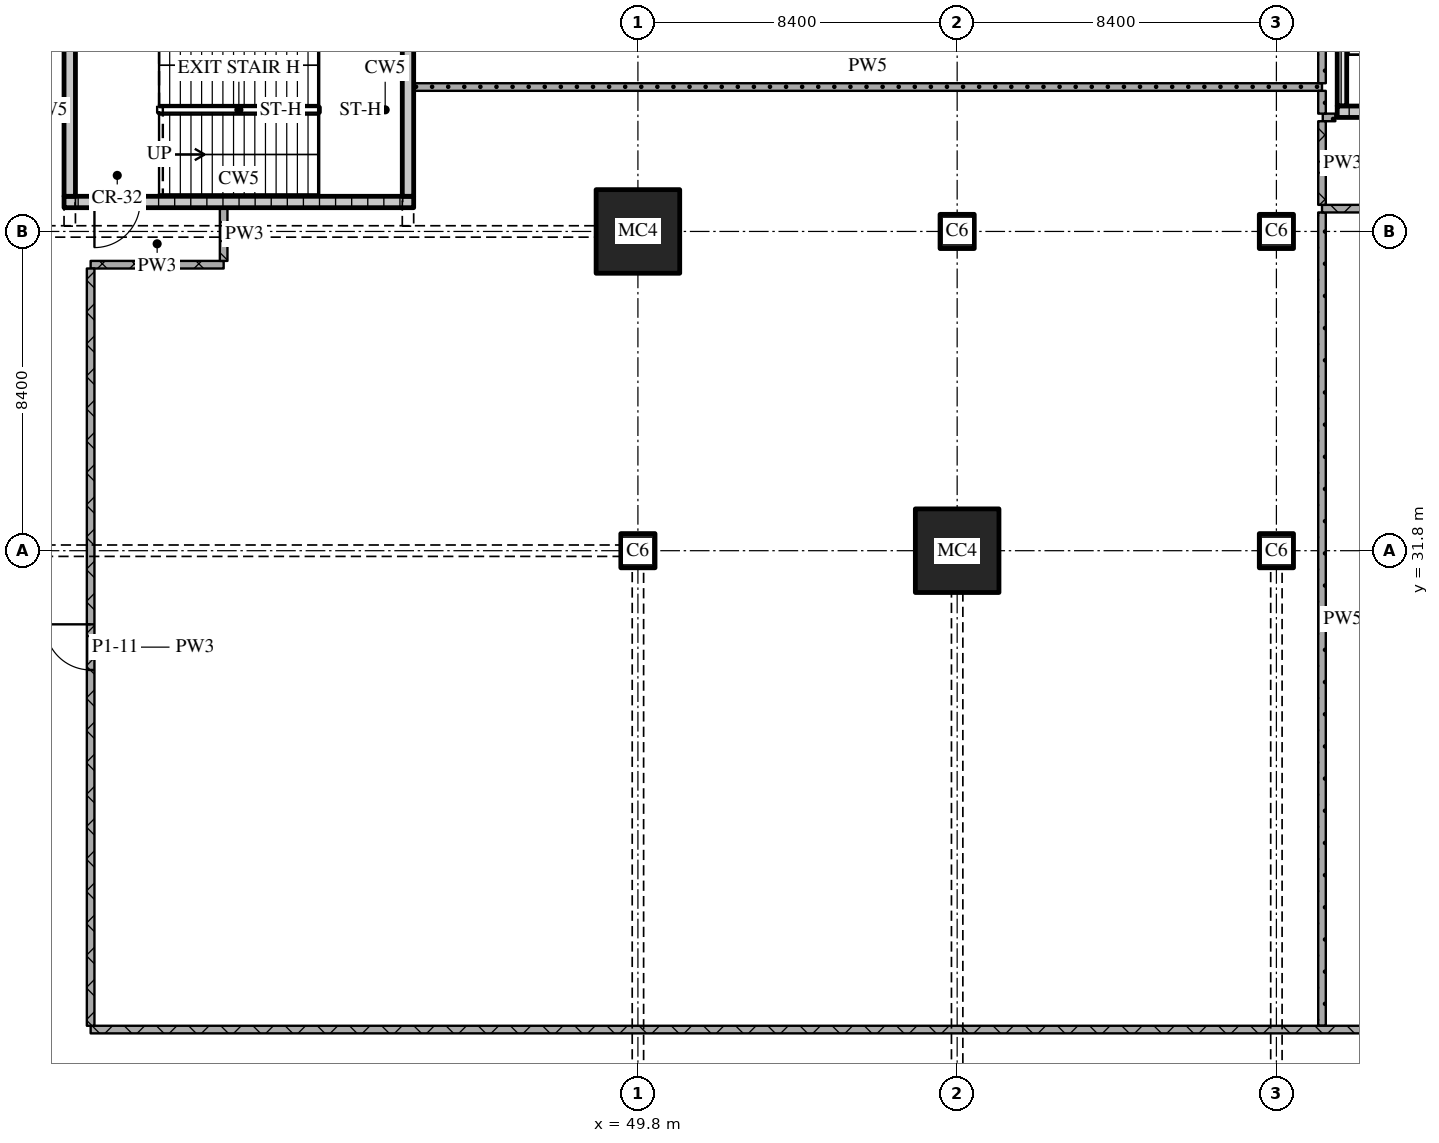
"""IFC4 building model, lengths in metres.
Left out: names, types, materials, properties, quantities, classifications, styles, units other than length and angle.
Written with IfcOpenShell. Run it as: python <this file> out.ifc"""

import sys

from ifc_helpers import new_model, si_unit, direction, frame, frame_2d, origin, origin_2d, place, context, subcontext, project, spatial, rectangle, extrude, element, fill, save


model = new_model("IFC4")
c1 = context("Model", 3, precision=1e-05, world=origin(), true_north=direction((0.0, 1.0)))
c2 = subcontext(c1, "Body", "Model", "MODEL_VIEW")
j1 = project(units=[si_unit("LENGTHUNIT", "METRE"), si_unit("PLANEANGLEUNIT", "RADIAN")], contexts=[c1])
p1 = place(None, origin())
s1 = spatial("IfcSite", under=j1, at=p1, CompositionType="ELEMENT")
p2 = place(p1, origin())
s2 = spatial("IfcBuilding", under=s1, at=p2, CompositionType="ELEMENT")
p3 = place(p2, frame((0.0, 0.0, 9.0)))
s3 = spatial("IfcBuildingStorey", under=s2, at=p3, CompositionType="ELEMENT", Elevation=9.0)
p4 = place(p3, frame((49.8, 31.8, 0.0), z_axis=(0.0, 0.0, 1.0), x_axis=(1.0, 0.0, 0.0)))
e1 = element("IfcColumn", 1, at=p4, inside=s3, PredefinedType="COLUMN", context=c2, shape_type="SweptSolid", body=[
    extrude(rectangle(XDim=0.9, YDim=0.9, at=origin_2d()), origin(), (0.0, 0.0, 1.0), 5.4),
])
for number, where, z_axis, x_axis in (
    (2, (49.8, 40.2, 0.0), (0.0, 0.0, 1.0), (1.0, 0.0, 0.0)),
    (3, (58.2, 31.8, 0.0), (0.0, 0.0, 1.0), (1.0, 0.0, 0.0)),
):
    element("IfcColumn", number, at=place(p3, frame(where, z_axis=z_axis, x_axis=x_axis)), inside=s3, PredefinedType="COLUMN", context=c2, shape_type="SweptSolid", body=[
        extrude(rectangle(XDim=2.2, YDim=2.2, at=origin_2d()), origin(), (0.0, 0.0, 1.0), 5.4),
    ])
for number, where, z_axis, x_axis in (
    (4, (58.2, 40.2, 0.0), (0.0, 0.0, 1.0), (1.0, 0.0, 0.0)),
    (5, (66.6, 31.8, 0.0), (0.0, 0.0, 1.0), (1.0, 0.0, 0.0)),
    (6, (66.6, 40.2, 0.0), (0.0, 0.0, 1.0), (1.0, 0.0, 0.0)),
):
    element("IfcColumn", number, at=place(p3, frame(where, z_axis=z_axis, x_axis=x_axis)), inside=s3, PredefinedType="COLUMN", context=c2, shape_type="SweptSolid", body=[
        extrude(rectangle(XDim=0.9, YDim=0.9, at=origin_2d()), origin(), (0.0, 0.0, 1.0), 5.4),
    ])
p5 = place(p3, frame((68.2, 43.35, 0.0), z_axis=(0.0, 0.0, 1.0), x_axis=(1.0, 0.0, 0.0)))
e7 = element("IfcWall", 7, at=p5, inside=s3, PredefinedType="SOLIDWALL", context=c2, shape_type="SweptSolid", body=[
    extrude(rectangle(XDim=5.6, YDim=0.3, at=frame_2d((2.8, 0.0))), origin(), (0.0, 0.0, 1.0), 5.1),
])
p6 = place(p5, frame((3.875, 0.0, 0.0)))
e8 = element("IfcOpeningElement", 8, at=p6, cuts=e7, PredefinedType="OPENING", context=c2, shape_type="SweptSolid", body=[
    extrude(rectangle(XDim=1.0, YDim=2.1, at=frame_2d((0.5, 1.05))), frame((0.0, 0.16, 0.0), z_axis=(0.0, -1.0, 0.0), x_axis=(1.0, 0.0, 0.0)), (0.0, 0.0, 1.0), 0.32),
])
p7 = place(p3, frame((68.325, 43.5, 0.0), z_axis=(0.0, 0.0, 1.0), x_axis=(0.0, 1.0, 0.0)))
e9 = element("IfcWall", 9, at=p7, inside=s3, PredefinedType="SOLIDWALL", context=c2, shape_type="SweptSolid", body=[
    extrude(rectangle(XDim=6.9, YDim=0.25, at=frame_2d((3.45, 0.0))), origin(), (0.0, 0.0, 1.0), 5.1),
])
p8 = place(p3, frame((34.7, 40.975, 0.0), z_axis=(0.0, 0.0, 1.0), x_axis=(1.0, 0.0, 0.0)))
e10 = element("IfcWall", 10, at=p8, inside=s3, PredefinedType="SOLIDWALL", context=c2, shape_type="SweptSolid", body=[
    extrude(rectangle(XDim=9.2, YDim=0.3, at=frame_2d((4.6, 0.0))), origin(), (0.0, 0.0, 1.0), 5.1),
])
p9 = place(p8, frame((0.8, 0.0, 0.0)))
e11 = element("IfcOpeningElement", 11, at=p9, cuts=e10, PredefinedType="OPENING", context=c2, shape_type="SweptSolid", body=[
    extrude(rectangle(XDim=1.2, YDim=2.1, at=frame_2d((0.6, 1.05))), frame((0.0, 0.16, 0.0), z_axis=(0.0, -1.0, 0.0), x_axis=(1.0, 0.0, 0.0)), (0.0, 0.0, 1.0), 0.32),
])
for number, where, z_axis, x_axis in (
    (12, (34.85, 41.125, 0.0), (0.0, 0.0, 1.0), (0.0, 1.0, 0.0)),
    (13, (43.75, 41.125, 0.0), (0.0, 0.0, 1.0), (0.0, 1.0, 0.0)),
):
    element("IfcWall", number, at=place(p3, frame(where, z_axis=z_axis, x_axis=x_axis)), inside=s3, PredefinedType="SOLIDWALL", context=c2, shape_type="SweptSolid", body=[
        extrude(rectangle(XDim=4.55, YDim=0.3, at=frame_2d((2.275, 0.0))), origin(), (0.0, 0.0, 1.0), 5.1),
    ])
p10 = place(p3, frame((35.4, 19.2, 0.0), z_axis=(0.0, 0.0, 1.0), x_axis=(1.0, 0.0, 0.0)))
e14 = element("IfcWall", 14, at=p10, inside=s3, PredefinedType="PARTITIONING", context=c2, shape_type="SweptSolid", body=[
    extrude(rectangle(XDim=104.4, YDim=0.2, at=frame_2d((52.2, 0.0))), origin(), (0.0, 0.0, 1.0), 5.1),
])
p11 = place(p10, frame((66.0, 0.0, 0.0)))
e15 = element("IfcOpeningElement", 15, at=p11, cuts=e14, PredefinedType="OPENING", context=c2, shape_type="SweptSolid", body=[
    extrude(rectangle(XDim=1.2, YDim=2.1, at=frame_2d((0.6, 1.05))), frame((0.0, 0.11, 0.0), z_axis=(0.0, -1.0, 0.0), x_axis=(1.0, 0.0, 0.0)), (0.0, 0.0, 1.0), 0.22),
])
p12 = place(p10, frame((87.6, 0.0, 0.0)))
e16 = element("IfcOpeningElement", 16, at=p12, cuts=e14, PredefinedType="OPENING", context=c2, shape_type="SweptSolid", body=[
    extrude(rectangle(XDim=1.2, YDim=2.1, at=frame_2d((0.6, 1.05))), frame((0.0, 0.11, 0.0), z_axis=(0.0, -1.0, 0.0), x_axis=(1.0, 0.0, 0.0)), (0.0, 0.0, 1.0), 0.22),
])
p13 = place(p3, frame((35.4, 39.325, 0.0), z_axis=(0.0, 0.0, 1.0), x_axis=(1.0, 0.0, 0.0)))
e17 = element("IfcWall", 17, at=p13, inside=s3, PredefinedType="PARTITIONING", context=c2, shape_type="SweptSolid", body=[
    extrude(rectangle(XDim=3.5, YDim=0.2, at=frame_2d((1.75, 0.0))), origin(), (0.0, 0.0, 1.0), 5.1),
])
p14 = place(p3, frame((67.8, 40.8, 0.0), z_axis=(0.0, 0.0, 1.0), x_axis=(1.0, 0.0, 0.0)))
e18 = element("IfcWall", 18, at=p14, inside=s3, PredefinedType="PARTITIONING", context=c2, shape_type="SweptSolid", body=[
    extrude(rectangle(XDim=7.2, YDim=0.2, at=frame_2d((3.6, 0.0))), origin(), (0.0, 0.0, 1.0), 5.1),
])
p15 = place(p3, frame((67.82, 43.2, 0.0), z_axis=(0.0, 0.0, 1.0), x_axis=(1.0, 0.0, 0.0)))
e19 = element("IfcWall", 19, at=p15, inside=s3, PredefinedType="PARTITIONING", context=c2, shape_type="SweptSolid", body=[
    extrude(rectangle(XDim=0.33, YDim=0.2, at=frame_2d((0.165, 0.0))), origin(), (0.0, 0.0, 1.0), 5.1),
])
p16 = place(p3, frame((43.9, 44.0, 0.0), z_axis=(0.0, 0.0, 1.0), x_axis=(1.0, 0.0, 0.0)))
e20 = element("IfcWall", 20, at=p16, inside=s3, PredefinedType="PARTITIONING", context=c2, shape_type="SweptSolid", body=[
    extrude(rectangle(XDim=23.9, YDim=0.2, at=frame_2d((11.95, 0.0))), origin(), (0.0, 0.0, 1.0), 5.1),
])
p17 = place(p3, frame((35.4, 39.225, 0.0), z_axis=(0.0, 0.0, 1.0), x_axis=(0.0, -1.0, 0.0)))
e21 = element("IfcWall", 21, at=p17, inside=s3, PredefinedType="PARTITIONING", context=c2, shape_type="SweptSolid", body=[
    extrude(rectangle(XDim=19.925, YDim=0.2, at=frame_2d((9.962, 0.0))), origin(), (0.0, 0.0, 1.0), 5.1),
])
p18 = place(p17, frame((9.363, 0.0, 0.0)))
e22 = element("IfcOpeningElement", 22, at=p18, cuts=e21, PredefinedType="OPENING", context=c2, shape_type="SweptSolid", body=[
    extrude(rectangle(XDim=1.2, YDim=2.1, at=frame_2d((0.6, 1.05))), frame((0.0, 0.11, 0.0), z_axis=(0.0, -1.0, 0.0), x_axis=(1.0, 0.0, 0.0)), (0.0, 0.0, 1.0), 0.22),
])
p19 = place(p3, frame((38.9, 40.825, 0.0), z_axis=(0.0, 0.0, 1.0), x_axis=(0.0, -1.0, 0.0)))
e23 = element("IfcWall", 23, at=p19, inside=s3, PredefinedType="PARTITIONING", context=c2, shape_type="SweptSolid", body=[
    extrude(rectangle(XDim=1.4, YDim=0.2, at=frame_2d((0.7, 0.0))), origin(), (0.0, 0.0, 1.0), 5.1),
])
p20 = place(p3, frame((67.8, 43.1, 0.0), z_axis=(0.0, 0.0, 1.0), x_axis=(0.0, -1.0, 0.0)))
e24 = element("IfcWall", 24, at=p20, inside=s3, PredefinedType="PARTITIONING", context=c2, shape_type="SweptSolid", body=[
    extrude(rectangle(XDim=2.2, YDim=0.2, at=frame_2d((1.1, 0.0))), origin(), (0.0, 0.0, 1.0), 5.1),
])
p21 = place(p3, frame((67.8, 43.9, 0.0), z_axis=(0.0, 0.0, 1.0), x_axis=(0.0, -1.0, 0.0)))
e25 = element("IfcWall", 25, at=p21, inside=s3, PredefinedType="PARTITIONING", context=c2, shape_type="SweptSolid", body=[
    extrude(rectangle(XDim=0.6, YDim=0.2, at=frame_2d((0.3, 0.0))), origin(), (0.0, 0.0, 1.0), 5.1),
])
p22 = place(p3, frame((67.8, 50.6, 0.0), z_axis=(0.0, 0.0, 1.0), x_axis=(0.0, -1.0, 0.0)))
e26 = element("IfcWall", 26, at=p22, inside=s3, PredefinedType="PARTITIONING", context=c2, shape_type="SweptSolid", body=[
    extrude(rectangle(XDim=6.5, YDim=0.2, at=frame_2d((3.25, 0.0))), origin(), (0.0, 0.0, 1.0), 5.1),
])
p23 = place(p3, frame((67.8, 40.7, 0.0), z_axis=(0.0, 0.0, 1.0), x_axis=(0.0, -1.0, 0.0)))
e27 = element("IfcWall", 27, at=p23, inside=s3, PredefinedType="PARTITIONING", context=c2, shape_type="SweptSolid", body=[
    extrude(rectangle(XDim=21.4, YDim=0.2, at=frame_2d((10.7, 0.0))), origin(), (0.0, 0.0, 1.0), 5.1),
])
p24 = place(p9, origin())
e28 = element("IfcDoor", 28, at=p24, inside=s3, OperationType="SINGLE_SWING_RIGHT", PredefinedType="DOOR", context=c2, shape_type="SweptSolid", body=[
    extrude(rectangle(XDim=1.2, YDim=2.1, at=frame_2d((0.6, 1.05))), frame((0.0, 0.025, 0.0), z_axis=(0.0, -1.0, 0.0), x_axis=(1.0, 0.0, 0.0)), (0.0, 0.0, 1.0), 0.05),
])
fill(e11, e28)
p25 = place(p18, origin())
e29 = element("IfcDoor", 29, at=p25, inside=s3, OperationType="SINGLE_SWING_RIGHT", PredefinedType="DOOR", context=c2, shape_type="SweptSolid", body=[
    extrude(rectangle(XDim=1.2, YDim=2.1, at=frame_2d((0.6, 1.05))), frame((0.0, 0.025, 0.0), z_axis=(0.0, -1.0, 0.0), x_axis=(1.0, 0.0, 0.0)), (0.0, 0.0, 1.0), 0.05),
])
fill(e22, e29)
save(model, sys.argv[1])
